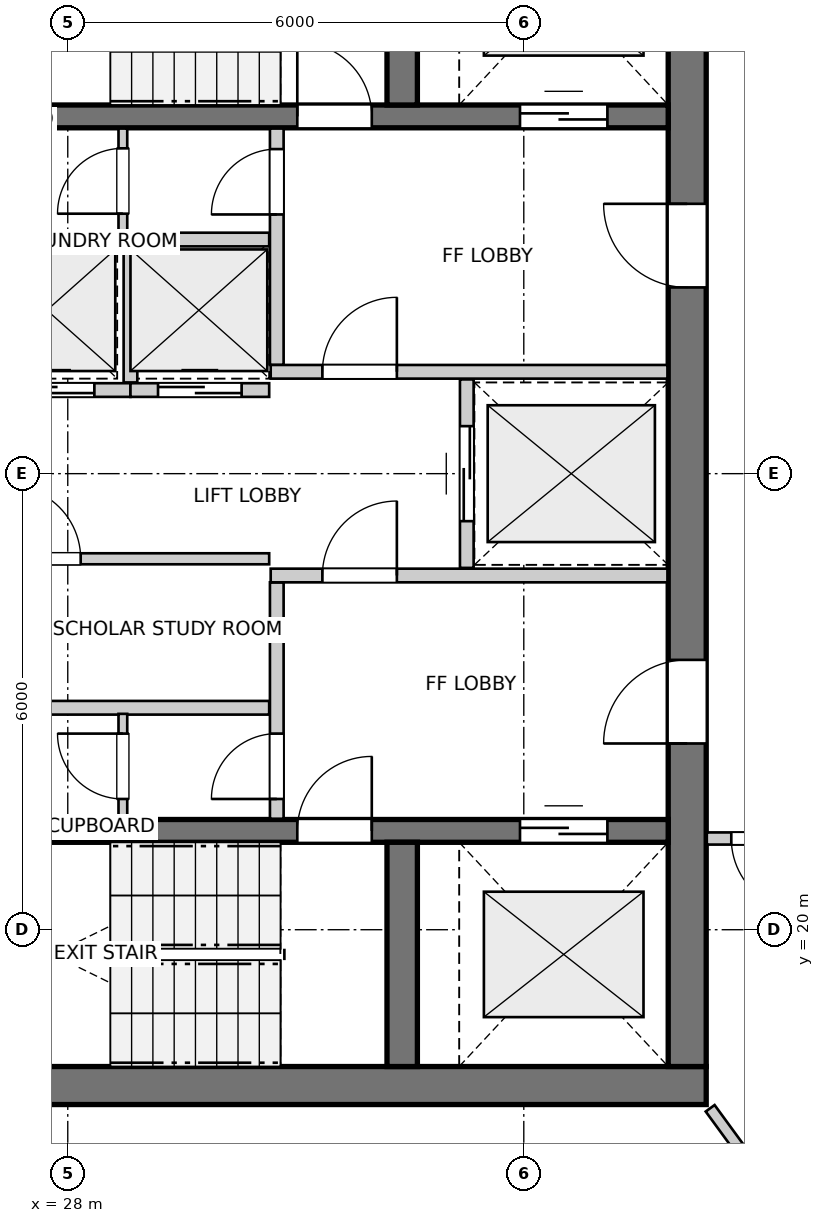
"""IFC4 building model, lengths in metres.
Left out: names, types, materials, properties, quantities, classifications, styles, units other than length and angle.
Written with IfcOpenShell. Run it as: python <this file> out.ifc"""

import sys

from ifc_helpers import new_model, si_unit, direction, frame, frame_2d, origin, place, context, subcontext, project, spatial, rectangle, extrude, source, transform, mapped, element, fill, save


model = new_model("IFC4")
c1 = context("Model", 3, precision=1e-05, world=origin(), true_north=direction((0.0, 1.0)))
c2 = subcontext(c1, "Body", "Model", "MODEL_VIEW")
j1 = project(units=[si_unit("LENGTHUNIT", "METRE"), si_unit("PLANEANGLEUNIT", "RADIAN")], contexts=[c1])
p1 = place(None, origin())
s1 = spatial("IfcSite", under=j1, at=p1, CompositionType="ELEMENT")
p2 = place(p1, origin())
s2 = spatial("IfcBuilding", under=s1, at=p2, CompositionType="ELEMENT")
p3 = place(p2, frame((0.0, 0.0, 218.0)))
s3 = spatial("IfcBuildingStorey", under=s2, at=p3, CompositionType="ELEMENT", Elevation=218.0)
p4 = place(p3, frame((24.3, 17.95, 0.0), z_axis=(0.0, 0.0, 1.0), x_axis=(1.0, 0.0, 0.0)))
e1 = element("IfcWall", 1, at=p4, inside=s3, PredefinedType="SHEAR", context=c2, shape_type="SweptSolid", body=[
    extrude(rectangle(XDim=12.1, YDim=0.5, at=frame_2d((6.05, 0.0))), origin(), (0.0, 0.0, 1.0), 2.96),
])
p5 = place(p3, frame((36.15, 18.2, 0.0), z_axis=(0.0, 0.0, 1.0), x_axis=(0.0, 1.0, 0.0)))
e2 = element("IfcWall", 2, at=p5, inside=s3, PredefinedType="SHEAR", context=c2, shape_type="SweptSolid", body=[
    extrude(rectangle(XDim=15.6, YDim=0.5, at=frame_2d((7.8, 0.0))), origin(), (0.0, 0.0, 1.0), 2.96),
])
p6 = place(p5, frame((4.25, 0.0, 0.0)))
e3 = element("IfcOpeningElement", 3, at=p6, cuts=e2, PredefinedType="OPENING", context=c2, shape_type="SweptSolid", body=[
    extrude(rectangle(XDim=1.1, YDim=2.15, at=frame_2d((0.55, 1.075))), frame((0.0, 0.26, 0.0), z_axis=(0.0, -1.0, 0.0), x_axis=(1.0, 0.0, 0.0)), (0.0, 0.0, 1.0), 0.52),
])
p7 = place(p5, frame((10.25, 0.0, 0.0)))
e4 = element("IfcOpeningElement", 4, at=p7, cuts=e2, PredefinedType="OPENING", context=c2, shape_type="SweptSolid", body=[
    extrude(rectangle(XDim=1.1, YDim=2.15, at=frame_2d((0.55, 1.075))), frame((0.0, 0.26, 0.0), z_axis=(0.0, -1.0, 0.0), x_axis=(1.0, 0.0, 0.0)), (0.0, 0.0, 1.0), 0.52),
])
p8 = place(p3, frame((24.8, 21.3, 0.0), z_axis=(0.0, 0.0, 1.0), x_axis=(1.0, 0.0, 0.0)))
e5 = element("IfcWall", 5, at=p8, inside=s3, PredefinedType="SHEAR", context=c2, shape_type="SweptSolid", body=[
    extrude(rectangle(XDim=11.1, YDim=0.3, at=frame_2d((5.55, 0.0))), origin(), (0.0, 0.0, 1.0), 2.96),
])
p9 = place(p8, frame((6.22, 0.0, 0.0)))
e6 = element("IfcOpeningElement", 6, at=p9, cuts=e5, PredefinedType="OPENING", context=c2, shape_type="SweptSolid", body=[
    extrude(rectangle(XDim=0.98, YDim=2.15, at=frame_2d((0.49, 1.075))), frame((0.0, 0.16, 0.0), z_axis=(0.0, -1.0, 0.0), x_axis=(1.0, 0.0, 0.0)), (0.0, 0.0, 1.0), 0.32),
])
p10 = place(p8, frame((9.15, 0.0, 0.0)))
e7 = element("IfcOpeningElement", 7, at=p10, cuts=e5, PredefinedType="OPENING", context=c2, shape_type="SweptSolid", body=[
    extrude(rectangle(XDim=1.15, YDim=2.15, at=frame_2d((0.575, 1.075))), frame((0.0, 0.16, 0.0), z_axis=(0.0, -1.0, 0.0), x_axis=(1.0, 0.0, 0.0)), (0.0, 0.0, 1.0), 0.32),
])
p11 = place(p3, frame((32.4, 18.2, 0.0), z_axis=(0.0, 0.0, 1.0), x_axis=(0.0, 1.0, 0.0)))
e8 = element("IfcWall", 8, at=p11, inside=s3, PredefinedType="SHEAR", context=c2, shape_type="SweptSolid", body=[
    extrude(rectangle(XDim=2.95, YDim=0.4, at=frame_2d((1.475, 0.0))), origin(), (0.0, 0.0, 1.0), 2.96),
])
p12 = place(p3, frame((24.8, 30.7, 0.0), z_axis=(0.0, 0.0, 1.0), x_axis=(1.0, 0.0, 0.0)))
e9 = element("IfcWall", 9, at=p12, inside=s3, PredefinedType="SHEAR", context=c2, shape_type="SweptSolid", body=[
    extrude(rectangle(XDim=11.1, YDim=0.3, at=frame_2d((5.55, 0.0))), origin(), (0.0, 0.0, 1.0), 2.96),
])
p13 = place(p12, frame((6.22, 0.0, 0.0)))
e10 = element("IfcOpeningElement", 10, at=p13, cuts=e9, PredefinedType="OPENING", context=c2, shape_type="SweptSolid", body=[
    extrude(rectangle(XDim=0.98, YDim=2.15, at=frame_2d((0.49, 1.075))), frame((0.0, 0.16, 0.0), z_axis=(0.0, -1.0, 0.0), x_axis=(1.0, 0.0, 0.0)), (0.0, 0.0, 1.0), 0.32),
])
p14 = place(p12, frame((9.15, 0.0, 0.0)))
e11 = element("IfcOpeningElement", 11, at=p14, cuts=e9, PredefinedType="OPENING", context=c2, shape_type="SweptSolid", body=[
    extrude(rectangle(XDim=1.15, YDim=2.15, at=frame_2d((0.575, 1.075))), frame((0.0, 0.16, 0.0), z_axis=(0.0, -1.0, 0.0), x_axis=(1.0, 0.0, 0.0)), (0.0, 0.0, 1.0), 0.32),
])
p15 = place(p3, frame((32.4, 30.85, 0.0), z_axis=(0.0, 0.0, 1.0), x_axis=(0.0, 1.0, 0.0)))
e12 = element("IfcWall", 12, at=p15, inside=s3, PredefinedType="SHEAR", context=c2, shape_type="SweptSolid", body=[
    extrude(rectangle(XDim=2.95, YDim=0.4, at=frame_2d((1.475, 0.0))), origin(), (0.0, 0.0, 1.0), 2.96),
])
p16 = place(p3, frame((30.75, 21.46, 0.0), z_axis=(0.0, 0.0, 1.0), x_axis=(0.0, 1.0, 0.0)))
e13 = element("IfcWall", 13, at=p16, inside=s3, PredefinedType="PARTITIONING", context=c2, shape_type="SweptSolid", body=[
    extrude(rectangle(XDim=3.11, YDim=0.18, at=frame_2d((1.555, 0.0))), origin(), (0.0, 0.0, 1.0), 2.96),
])
p17 = place(p16, frame((0.26, 0.0, 0.0)))
e14 = element("IfcOpeningElement", 14, at=p17, cuts=e13, PredefinedType="OPENING", context=c2, shape_type="SweptSolid", body=[
    extrude(rectangle(XDim=0.86, YDim=2.05, at=frame_2d((0.43, 1.025))), frame((0.0, 0.1, 0.0), z_axis=(0.0, -1.0, 0.0), x_axis=(1.0, 0.0, 0.0)), (0.0, 0.0, 1.0), 0.2),
])
p18 = place(p3, frame((30.67, 24.66, 0.0), z_axis=(0.0, 0.0, 1.0), x_axis=(1.0, 0.0, 0.0)))
e15 = element("IfcWall", 15, at=p18, inside=s3, PredefinedType="PARTITIONING", context=c2, shape_type="SweptSolid", body=[
    extrude(rectangle(XDim=5.22, YDim=0.18, at=frame_2d((2.61, 0.0))), origin(), (0.0, 0.0, 1.0), 2.96),
])
p19 = place(p18, frame((0.68, 0.0, 0.0)))
e16 = element("IfcOpeningElement", 16, at=p19, cuts=e15, PredefinedType="OPENING", context=c2, shape_type="SweptSolid", body=[
    extrude(rectangle(XDim=0.98, YDim=2.15, at=frame_2d((0.49, 1.075))), frame((0.0, 0.1, 0.0), z_axis=(0.0, -1.0, 0.0), x_axis=(1.0, 0.0, 0.0)), (0.0, 0.0, 1.0), 0.2),
])
p20 = place(p3, frame((30.75, 27.43, 0.0), z_axis=(0.0, 0.0, 1.0), x_axis=(0.0, 1.0, 0.0)))
e17 = element("IfcWall", 17, at=p20, inside=s3, PredefinedType="PARTITIONING", context=c2, shape_type="SweptSolid", body=[
    extrude(rectangle(XDim=3.11, YDim=0.18, at=frame_2d((1.555, 0.0))), origin(), (0.0, 0.0, 1.0), 2.96),
])
p21 = place(p20, frame((1.98, 0.0, 0.0)))
e18 = element("IfcOpeningElement", 18, at=p21, cuts=e17, PredefinedType="OPENING", context=c2, shape_type="SweptSolid", body=[
    extrude(rectangle(XDim=0.86, YDim=2.05, at=frame_2d((0.43, 1.025))), frame((0.0, 0.1, 0.0), z_axis=(0.0, -1.0, 0.0), x_axis=(1.0, 0.0, 0.0)), (0.0, 0.0, 1.0), 0.2),
])
p22 = place(p3, frame((30.67, 27.34, 0.0), z_axis=(0.0, 0.0, 1.0), x_axis=(1.0, 0.0, 0.0)))
e19 = element("IfcWall", 19, at=p22, inside=s3, PredefinedType="PARTITIONING", context=c2, shape_type="SweptSolid", body=[
    extrude(rectangle(XDim=5.22, YDim=0.18, at=frame_2d((2.61, 0.0))), origin(), (0.0, 0.0, 1.0), 2.96),
])
p23 = place(p22, frame((0.68, 0.0, 0.0)))
e20 = element("IfcOpeningElement", 20, at=p23, cuts=e19, PredefinedType="OPENING", context=c2, shape_type="SweptSolid", body=[
    extrude(rectangle(XDim=0.98, YDim=2.15, at=frame_2d((0.49, 1.075))), frame((0.0, 0.1, 0.0), z_axis=(0.0, -1.0, 0.0), x_axis=(1.0, 0.0, 0.0)), (0.0, 0.0, 1.0), 0.2),
])
p24 = place(p3, frame((33.25, 24.76, 0.0), z_axis=(0.0, 0.0, 1.0), x_axis=(0.0, 1.0, 0.0)))
e21 = element("IfcWall", 21, at=p24, inside=s3, PredefinedType="PARTITIONING", context=c2, shape_type="SweptSolid", body=[
    extrude(rectangle(XDim=2.48, YDim=0.18, at=frame_2d((1.24, 0.0))), origin(), (0.0, 0.0, 1.0), 2.96),
])
p25 = place(p24, frame((0.615, 0.0, 0.0)))
e22 = element("IfcOpeningElement", 22, at=p25, cuts=e21, PredefinedType="OPENING", context=c2, shape_type="SweptSolid", body=[
    extrude(rectangle(XDim=1.25, YDim=2.15, at=frame_2d((0.625, 1.075))), frame((0.0, 0.1, 0.0), z_axis=(0.0, -1.0, 0.0), x_axis=(1.0, 0.0, 0.0)), (0.0, 0.0, 1.0), 0.2),
])
p26 = place(p3, frame((24.81, 22.92, 0.0), z_axis=(0.0, 0.0, 1.0), x_axis=(1.0, 0.0, 0.0)))
e23 = element("IfcWall", 23, at=p26, inside=s3, PredefinedType="PARTITIONING", context=c2, shape_type="SweptSolid", body=[
    extrude(rectangle(XDim=5.84, YDim=0.18, at=frame_2d((2.92, 0.0))), origin(), (0.0, 0.0, 1.0), 2.96),
])
p27 = place(p3, frame((24.81, 24.88, 0.0), z_axis=(0.0, 0.0, 1.0), x_axis=(1.0, 0.0, 0.0)))
e24 = element("IfcWall", 24, at=p27, inside=s3, PredefinedType="PARTITIONING", context=c2, shape_type="SweptSolid", body=[
    extrude(rectangle(XDim=5.84, YDim=0.145, at=frame_2d((2.92, 0.0))), origin(), (0.0, 0.0, 1.0), 2.96),
])
p28 = place(p27, frame((2.4, 0.0, 0.0)))
e25 = element("IfcOpeningElement", 25, at=p28, cuts=e24, PredefinedType="OPENING", context=c2, shape_type="SweptSolid", body=[
    extrude(rectangle(XDim=0.96, YDim=2.1, at=frame_2d((0.48, 1.05))), frame((0.0, 0.083, 0.0), z_axis=(0.0, -1.0, 0.0), x_axis=(1.0, 0.0, 0.0)), (0.0, 0.0, 1.0), 0.165),
])
p29 = place(p3, frame((24.81, 29.08, 0.0), z_axis=(0.0, 0.0, 1.0), x_axis=(1.0, 0.0, 0.0)))
e26 = element("IfcWall", 26, at=p29, inside=s3, PredefinedType="PARTITIONING", context=c2, shape_type="SweptSolid", body=[
    extrude(rectangle(XDim=5.84, YDim=0.18, at=frame_2d((2.92, 0.0))), origin(), (0.0, 0.0, 1.0), 2.96),
])
p30 = place(p3, frame((26.775, 27.1, 0.0), z_axis=(0.0, 0.0, 1.0), x_axis=(1.0, 0.0, 0.0)))
e27 = element("IfcWall", 27, at=p30, inside=s3, PredefinedType="PARTITIONING", context=c2, shape_type="SweptSolid", body=[
    extrude(rectangle(XDim=2.05, YDim=0.18, at=frame_2d((1.025, 0.0))), origin(), (0.0, 0.0, 1.0), 2.96),
])
p31 = place(p30, frame((0.475, 0.0, 0.0)))
e28 = element("IfcOpeningElement", 28, at=p31, cuts=e27, PredefinedType="OPENING", context=c2, shape_type="SweptSolid", body=[
    extrude(rectangle(XDim=1.1, YDim=2.15, at=frame_2d((0.55, 1.075))), frame((0.0, 0.1, 0.0), z_axis=(0.0, -1.0, 0.0), x_axis=(1.0, 0.0, 0.0)), (0.0, 0.0, 1.0), 0.2),
])
p32 = place(p3, frame((28.825, 27.1, 0.0), z_axis=(0.0, 0.0, 1.0), x_axis=(1.0, 0.0, 0.0)))
e29 = element("IfcWall", 29, at=p32, inside=s3, PredefinedType="PARTITIONING", context=c2, shape_type="SweptSolid", body=[
    extrude(rectangle(XDim=1.825, YDim=0.18, at=frame_2d((0.913, 0.0))), origin(), (0.0, 0.0, 1.0), 2.96),
])
p33 = place(p32, frame((0.363, 0.0, 0.0)))
e30 = element("IfcOpeningElement", 30, at=p33, cuts=e29, PredefinedType="OPENING", context=c2, shape_type="SweptSolid", body=[
    extrude(rectangle(XDim=1.1, YDim=2.15, at=frame_2d((0.55, 1.075))), frame((0.0, 0.1, 0.0), z_axis=(0.0, -1.0, 0.0), x_axis=(1.0, 0.0, 0.0)), (0.0, 0.0, 1.0), 0.2),
])
p34 = place(p3, frame((28.825, 27.2, 0.0), z_axis=(0.0, 0.0, 1.0), x_axis=(0.0, 1.0, 0.0)))
e31 = element("IfcWall", 31, at=p34, inside=s3, PredefinedType="PARTITIONING", context=c2, shape_type="SweptSolid", body=[
    extrude(rectangle(XDim=1.78, YDim=0.18, at=frame_2d((0.89, 0.0))), origin(), (0.0, 0.0, 1.0), 2.96),
])
p35 = place(p3, frame((28.725, 21.46, 0.0), z_axis=(0.0, 0.0, 1.0), x_axis=(0.0, 1.0, 0.0)))
e32 = element("IfcWall", 32, at=p35, inside=s3, PredefinedType="PARTITIONING", context=c2, shape_type="SweptSolid", body=[
    extrude(rectangle(XDim=1.38, YDim=0.115, at=frame_2d((0.69, 0.0))), origin(), (0.0, 0.0, 1.0), 2.96),
])
p36 = place(p35, frame((0.26, 0.0, 0.0)))
e33 = element("IfcOpeningElement", 33, at=p36, cuts=e32, PredefinedType="OPENING", context=c2, shape_type="SweptSolid", body=[
    extrude(rectangle(XDim=0.86, YDim=2.05, at=frame_2d((0.43, 1.025))), frame((0.0, 0.067, 0.0), z_axis=(0.0, -1.0, 0.0), x_axis=(1.0, 0.0, 0.0)), (0.0, 0.0, 1.0), 0.135),
])
p37 = place(p3, frame((28.725, 29.16, 0.0), z_axis=(0.0, 0.0, 1.0), x_axis=(0.0, 1.0, 0.0)))
e34 = element("IfcWall", 34, at=p37, inside=s3, PredefinedType="PARTITIONING", context=c2, shape_type="SweptSolid", body=[
    extrude(rectangle(XDim=1.38, YDim=0.115, at=frame_2d((0.69, 0.0))), origin(), (0.0, 0.0, 1.0), 2.96),
])
p38 = place(p37, frame((0.26, 0.0, 0.0)))
e35 = element("IfcOpeningElement", 35, at=p38, cuts=e34, PredefinedType="OPENING", context=c2, shape_type="SweptSolid", body=[
    extrude(rectangle(XDim=0.86, YDim=2.05, at=frame_2d((0.43, 1.025))), frame((0.0, 0.067, 0.0), z_axis=(0.0, -1.0, 0.0), x_axis=(1.0, 0.0, 0.0)), (0.0, 0.0, 1.0), 0.135),
])
p39 = place(p3, frame((38.02, 21.2, 0.0), z_axis=(0.0, 0.0, 1.0), x_axis=(-1.0, 0.0, 0.0)))
e36 = element("IfcWall", 36, at=p39, inside=s3, PredefinedType="PARTITIONING", context=c2, shape_type="SweptSolid", body=[
    extrude(rectangle(XDim=1.612, YDim=0.16, at=frame_2d((0.806, 0.0))), origin(), (0.0, 0.0, 1.0), 2.96),
])
p40 = place(p39, frame((0.33, 0.0, 0.0)))
e37 = element("IfcOpeningElement", 37, at=p40, cuts=e36, PredefinedType="OPENING", context=c2, shape_type="SweptSolid", body=[
    extrude(rectangle(XDim=0.96, YDim=2.1, at=frame_2d((0.48, 1.05))), frame((0.0, 0.09, 0.0), z_axis=(0.0, -1.0, 0.0), x_axis=(1.0, 0.0, 0.0)), (0.0, 0.0, 1.0), 0.18),
])
p41 = place(p3, frame((36.452, 17.651, 0.0), z_axis=(0.0, 0.0, 1.0), x_axis=(0.58995882053, -0.807433334758, 0.0)))
e38 = element("IfcWall", 38, at=p41, inside=s3, PredefinedType="PARTITIONING", context=c2, shape_type="SweptSolid", body=[
    extrude(rectangle(XDim=5.722, YDim=0.145, at=frame_2d((2.861, 0.0))), origin(), (0.0, 0.0, 1.0), 2.96),
])
m1 = source(origin(), c2, "Body", "SweptSolid", [
    extrude(rectangle(XDim=0.98, YDim=2.15, at=frame_2d((0.49, 1.075))), frame((0.0, 0.025, 0.0), z_axis=(0.0, -1.0, 0.0), x_axis=(1.0, 0.0, 0.0)), (0.0, 0.0, 1.0), 0.05),
])
p42 = place(p9, origin())
e39 = element("IfcDoor", 39, at=p42, inside=s3, OperationType="SINGLE_SWING_RIGHT", PredefinedType="DOOR", context=c2, shape_type="MappedRepresentation", body=[
    mapped(m1, transform((0.0, 0.0, 0.0), x_axis=(1.0, 0.0, 0.0), y_axis=(0.0, 1.0, 0.0), z_axis=(0.0, 0.0, 1.0), scale=1.0)),
])
fill(e6, e39)
m2 = source(origin(), c2, "Body", "SweptSolid", [
    extrude(rectangle(XDim=1.15, YDim=2.15, at=frame_2d((0.575, 1.075))), frame((0.0, 0.025, 0.0), z_axis=(0.0, -1.0, 0.0), x_axis=(1.0, 0.0, 0.0)), (0.0, 0.0, 1.0), 0.05),
])
p43 = place(p10, origin())
e40 = element("IfcDoor", 40, at=p43, inside=s3, OperationType="DOUBLE_DOOR_SLIDING", PredefinedType="DOOR", context=c2, shape_type="MappedRepresentation", body=[
    mapped(m2, transform((0.0, 0.0, 0.0), x_axis=(1.0, 0.0, 0.0), y_axis=(0.0, 1.0, 0.0), z_axis=(0.0, 0.0, 1.0), scale=1.0)),
])
fill(e7, e40)
p44 = place(p13, origin())
e41 = element("IfcDoor", 41, at=p44, inside=s3, OperationType="SINGLE_SWING_LEFT", PredefinedType="DOOR", context=c2, shape_type="MappedRepresentation", body=[
    mapped(m1, transform((0.0, 0.0, 0.0), x_axis=(1.0, 0.0, 0.0), y_axis=(0.0, 1.0, 0.0), z_axis=(0.0, 0.0, 1.0), scale=1.0)),
])
fill(e10, e41)
p45 = place(p14, origin())
e42 = element("IfcDoor", 42, at=p45, inside=s3, OperationType="DOUBLE_DOOR_SLIDING", PredefinedType="DOOR", context=c2, shape_type="MappedRepresentation", body=[
    mapped(m2, transform((0.0, 0.0, 0.0), x_axis=(1.0, 0.0, 0.0), y_axis=(0.0, 1.0, 0.0), z_axis=(0.0, 0.0, 1.0), scale=1.0)),
])
fill(e11, e42)
m3 = source(origin(), c2, "Body", "SweptSolid", [
    extrude(rectangle(XDim=1.1, YDim=2.15, at=frame_2d((0.55, 1.075))), frame((0.0, 0.025, 0.0), z_axis=(0.0, -1.0, 0.0), x_axis=(1.0, 0.0, 0.0)), (0.0, 0.0, 1.0), 0.05),
])
p46 = place(p6, origin())
e43 = element("IfcDoor", 43, at=p46, inside=s3, OperationType="SINGLE_SWING_LEFT", PredefinedType="DOOR", context=c2, shape_type="MappedRepresentation", body=[
    mapped(m3, transform((0.0, 0.0, 0.0), x_axis=(1.0, 0.0, 0.0), y_axis=(0.0, 1.0, 0.0), z_axis=(0.0, 0.0, 1.0), scale=1.0)),
])
fill(e3, e43)
p47 = place(p7, origin())
e44 = element("IfcDoor", 44, at=p47, inside=s3, OperationType="SINGLE_SWING_RIGHT", PredefinedType="DOOR", context=c2, shape_type="MappedRepresentation", body=[
    mapped(m3, transform((0.0, 0.0, 0.0), x_axis=(1.0, 0.0, 0.0), y_axis=(0.0, 1.0, 0.0), z_axis=(0.0, 0.0, 1.0), scale=1.0)),
])
fill(e4, e44)
m4 = source(origin(), c2, "Body", "SweptSolid", [
    extrude(rectangle(XDim=0.86, YDim=2.05, at=frame_2d((0.43, 1.025))), frame((0.0, 0.025, 0.0), z_axis=(0.0, -1.0, 0.0), x_axis=(1.0, 0.0, 0.0)), (0.0, 0.0, 1.0), 0.05),
])
p48 = place(p17, origin())
e45 = element("IfcDoor", 45, at=p48, inside=s3, OperationType="SINGLE_SWING_LEFT", PredefinedType="DOOR", context=c2, shape_type="MappedRepresentation", body=[
    mapped(m4, transform((0.0, 0.0, 0.0), x_axis=(1.0, 0.0, 0.0), y_axis=(0.0, 1.0, 0.0), z_axis=(0.0, 0.0, 1.0), scale=1.0)),
])
fill(e14, e45)
p49 = place(p19, origin())
e46 = element("IfcDoor", 46, at=p49, inside=s3, OperationType="SINGLE_SWING_RIGHT", PredefinedType="DOOR", context=c2, shape_type="MappedRepresentation", body=[
    mapped(m1, transform((0.0, 0.0, 0.0), x_axis=(1.0, 0.0, 0.0), y_axis=(0.0, 1.0, 0.0), z_axis=(0.0, 0.0, 1.0), scale=1.0)),
])
fill(e16, e46)
p50 = place(p21, origin())
e47 = element("IfcDoor", 47, at=p50, inside=s3, OperationType="SINGLE_SWING_LEFT", PredefinedType="DOOR", context=c2, shape_type="MappedRepresentation", body=[
    mapped(m4, transform((0.0, 0.0, 0.0), x_axis=(1.0, 0.0, 0.0), y_axis=(0.0, 1.0, 0.0), z_axis=(0.0, 0.0, 1.0), scale=1.0)),
])
fill(e18, e47)
p51 = place(p23, origin())
e48 = element("IfcDoor", 48, at=p51, inside=s3, OperationType="SINGLE_SWING_RIGHT", PredefinedType="DOOR", context=c2, shape_type="MappedRepresentation", body=[
    mapped(m1, transform((0.0, 0.0, 0.0), x_axis=(1.0, 0.0, 0.0), y_axis=(0.0, 1.0, 0.0), z_axis=(0.0, 0.0, 1.0), scale=1.0)),
])
fill(e20, e48)
m5 = source(origin(), c2, "Body", "SweptSolid", [
    extrude(rectangle(XDim=1.25, YDim=2.15, at=frame_2d((0.625, 1.075))), frame((0.0, 0.025, 0.0), z_axis=(0.0, -1.0, 0.0), x_axis=(1.0, 0.0, 0.0)), (0.0, 0.0, 1.0), 0.05),
])
p52 = place(p25, origin())
e49 = element("IfcDoor", 49, at=p52, inside=s3, OperationType="DOUBLE_DOOR_SLIDING", PredefinedType="DOOR", context=c2, shape_type="MappedRepresentation", body=[
    mapped(m5, transform((0.0, 0.0, 0.0), x_axis=(1.0, 0.0, 0.0), y_axis=(0.0, 1.0, 0.0), z_axis=(0.0, 0.0, 1.0), scale=1.0)),
])
fill(e22, e49)
m6 = source(origin(), c2, "Body", "SweptSolid", [
    extrude(rectangle(XDim=0.96, YDim=2.1, at=frame_2d((0.48, 1.05))), frame((0.0, 0.025, 0.0), z_axis=(0.0, -1.0, 0.0), x_axis=(1.0, 0.0, 0.0)), (0.0, 0.0, 1.0), 0.05),
])
p53 = place(p28, origin())
e50 = element("IfcDoor", 50, at=p53, inside=s3, OperationType="SINGLE_SWING_LEFT", PredefinedType="DOOR", context=c2, shape_type="MappedRepresentation", body=[
    mapped(m6, transform((0.0, 0.0, 0.0), x_axis=(1.0, 0.0, 0.0), y_axis=(0.0, 1.0, 0.0), z_axis=(0.0, 0.0, 1.0), scale=1.0)),
])
fill(e25, e50)
p54 = place(p31, origin())
e51 = element("IfcDoor", 51, at=p54, inside=s3, OperationType="DOUBLE_DOOR_SLIDING", PredefinedType="DOOR", context=c2, shape_type="MappedRepresentation", body=[
    mapped(m3, transform((0.0, 0.0, 0.0), x_axis=(1.0, 0.0, 0.0), y_axis=(0.0, 1.0, 0.0), z_axis=(0.0, 0.0, 1.0), scale=1.0)),
])
fill(e28, e51)
p55 = place(p33, origin())
e52 = element("IfcDoor", 52, at=p55, inside=s3, OperationType="DOUBLE_DOOR_SLIDING", PredefinedType="DOOR", context=c2, shape_type="MappedRepresentation", body=[
    mapped(m3, transform((0.0, 0.0, 0.0), x_axis=(1.0, 0.0, 0.0), y_axis=(0.0, 1.0, 0.0), z_axis=(0.0, 0.0, 1.0), scale=1.0)),
])
fill(e30, e52)
p56 = place(p36, origin())
e53 = element("IfcDoor", 53, at=p56, inside=s3, OperationType="SINGLE_SWING_RIGHT", PredefinedType="DOOR", context=c2, shape_type="MappedRepresentation", body=[
    mapped(m4, transform((0.0, 0.0, 0.0), x_axis=(1.0, 0.0, 0.0), y_axis=(0.0, 1.0, 0.0), z_axis=(0.0, 0.0, 1.0), scale=1.0)),
])
fill(e33, e53)
p57 = place(p38, origin())
e54 = element("IfcDoor", 54, at=p57, inside=s3, OperationType="SINGLE_SWING_LEFT", PredefinedType="DOOR", context=c2, shape_type="MappedRepresentation", body=[
    mapped(m4, transform((0.0, 0.0, 0.0), x_axis=(1.0, 0.0, 0.0), y_axis=(0.0, 1.0, 0.0), z_axis=(0.0, 0.0, 1.0), scale=1.0)),
])
fill(e35, e54)
p58 = place(p40, origin())
e55 = element("IfcDoor", 55, at=p58, inside=s3, OperationType="SINGLE_SWING_LEFT", PredefinedType="DOOR", context=c2, shape_type="MappedRepresentation", body=[
    mapped(m6, transform((0.0, 0.0, 0.0), x_axis=(1.0, 0.0, 0.0), y_axis=(0.0, 1.0, 0.0), z_axis=(0.0, 0.0, 1.0), scale=1.0)),
])
fill(e37, e55)
save(model, sys.argv[1])
